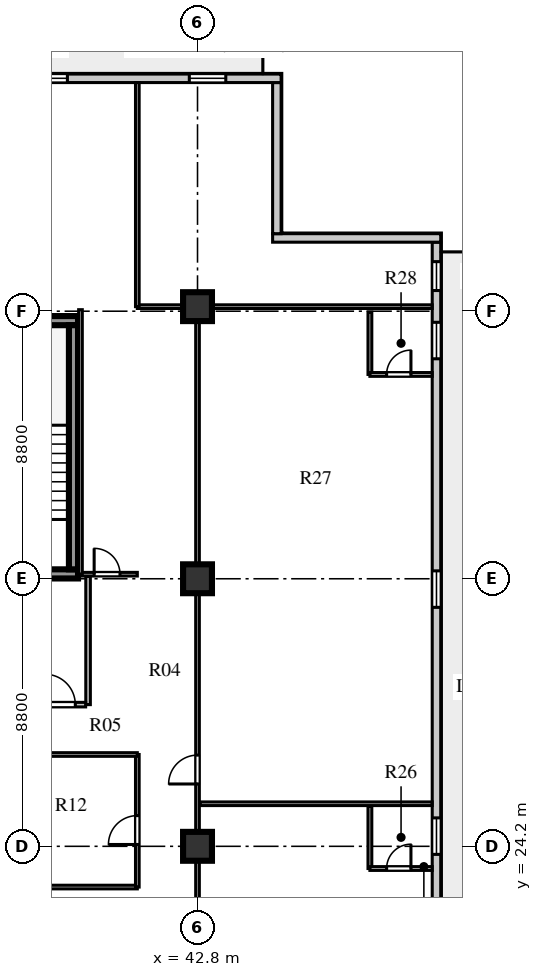
"""IFC4 building model, lengths in metres.
Left out: names, types, materials, properties, quantities, classifications, styles, units other than length and angle.
Written with IfcOpenShell. Run it as: python <this file> out.ifc"""

import sys

from ifc_helpers import new_model, si_unit, direction, frame, frame_2d, origin, origin_2d, place, context, subcontext, project, spatial, rectangle, extrude, element, fill, save


model = new_model("IFC4")
c1 = context("Model", 3, precision=1e-05, world=origin(), true_north=direction((0.0, 1.0)))
c2 = subcontext(c1, "Body", "Model", "MODEL_VIEW")
j1 = project(units=[si_unit("LENGTHUNIT", "METRE"), si_unit("PLANEANGLEUNIT", "RADIAN")], contexts=[c1])
p1 = place(None, origin())
s1 = spatial("IfcSite", under=j1, at=p1, CompositionType="ELEMENT")
p2 = place(p1, origin())
s2 = spatial("IfcBuilding", under=s1, at=p2, CompositionType="ELEMENT")
p3 = place(p2, frame((0.0, 0.0, 173.3)))
s3 = spatial("IfcBuildingStorey", under=s2, at=p3, CompositionType="ELEMENT", Elevation=173.3)
for number, where, z_axis, x_axis in (
    (1, (34.275, 33.16, 0.0), (0.0, 0.0, 1.0), (1.0, 0.0, 0.0)),
    (2, (34.275, 41.49, 0.0), (0.0, 0.0, 1.0), (1.0, 0.0, 0.0)),
):
    element("IfcWall", number, at=place(p3, frame(where, z_axis=z_axis, x_axis=x_axis)), inside=s3, PredefinedType="SHEAR", context=c2, shape_type="SweptSolid", body=[
        extrude(rectangle(XDim=4.595, YDim=0.3, at=frame_2d((2.298, 0.0))), origin(), (0.0, 0.0, 1.0), 3.6),
    ])
p4 = place(p3, frame((38.72, 33.31, 0.0), z_axis=(0.0, 0.0, 1.0), x_axis=(0.0, 1.0, 0.0)))
e3 = element("IfcWall", 3, at=p4, inside=s3, PredefinedType="SHEAR", context=c2, shape_type="SweptSolid", body=[
    extrude(rectangle(XDim=8.03, YDim=0.3, at=frame_2d((4.015, 0.0))), origin(), (0.0, 0.0, 1.0), 3.6),
])
for number, where, z_axis, x_axis in (
    (4, (42.8, 24.2, 0.0), (0.0, 0.0, 1.0), (1.0, 0.0, 0.0)),
    (5, (42.8, 33.0, 0.0), (0.0, 0.0, 1.0), (1.0, 0.0, 0.0)),
    (6, (42.8, 41.95, 0.0), (0.0, 0.0, 1.0), (1.0, 0.0, 0.0)),
):
    element("IfcColumn", number, at=place(p3, frame(where, z_axis=z_axis, x_axis=x_axis)), inside=s3, PredefinedType="COLUMN", context=c2, shape_type="SweptSolid", body=[
        extrude(rectangle(XDim=0.95, YDim=0.95, at=origin_2d()), origin(), (0.0, 0.0, 1.0), 3.6),
    ])
p5 = place(p3, frame((50.66, 13.13, 0.0), z_axis=(0.0, 0.0, 1.0), x_axis=(0.0, 1.0, 0.0)))
e7 = element("IfcWall", 7, at=p5, inside=s3, PredefinedType="STANDARD", context=c2, shape_type="SweptSolid", body=[
    extrude(rectangle(XDim=30.94, YDim=0.28, at=frame_2d((15.47, 0.0))), origin(), (0.0, 0.0, 1.0), 3.6),
])
p6 = place(p5, frame((0.64, 0.0, 0.8)))
e8 = element("IfcOpeningElement", 8, at=p6, cuts=e7, PredefinedType="OPENING", context=c2, shape_type="SweptSolid", body=[
    extrude(rectangle(XDim=0.95, YDim=1.65, at=frame_2d((0.475, 0.825))), frame((0.0, 0.15, 0.0), z_axis=(0.0, -1.0, 0.0), x_axis=(1.0, 0.0, 0.0)), (0.0, 0.0, 1.0), 0.3),
])
p7 = place(p5, frame((2.61, 0.0, 0.0)))
e9 = element("IfcOpeningElement", 9, at=p7, cuts=e7, PredefinedType="OPENING", context=c2, shape_type="SweptSolid", body=[
    extrude(rectangle(XDim=1.0, YDim=2.05, at=frame_2d((0.5, 1.025))), frame((0.0, 0.15, 0.0), z_axis=(0.0, -1.0, 0.0), x_axis=(1.0, 0.0, 0.0)), (0.0, 0.0, 1.0), 0.3),
])
p8 = place(p5, frame((6.105, 0.0, 0.8)))
e10 = element("IfcOpeningElement", 10, at=p8, cuts=e7, PredefinedType="OPENING", context=c2, shape_type="SweptSolid", body=[
    extrude(rectangle(XDim=1.8, YDim=2.0, at=frame_2d((0.9, 1.0))), frame((0.0, 0.15, 0.0), z_axis=(0.0, -1.0, 0.0), x_axis=(1.0, 0.0, 0.0)), (0.0, 0.0, 1.0), 0.3),
])
p9 = place(p5, frame((10.805, 0.0, 0.8)))
e11 = element("IfcOpeningElement", 11, at=p9, cuts=e7, PredefinedType="OPENING", context=c2, shape_type="SweptSolid", body=[
    extrude(rectangle(XDim=1.2, YDim=1.75, at=frame_2d((0.6, 0.875))), frame((0.0, 0.15, 0.0), z_axis=(0.0, -1.0, 0.0), x_axis=(1.0, 0.0, 0.0)), (0.0, 0.0, 1.0), 0.3),
])
p10 = place(p5, frame((18.93, 0.0, 0.8)))
e12 = element("IfcOpeningElement", 12, at=p10, cuts=e7, PredefinedType="OPENING", context=c2, shape_type="SweptSolid", body=[
    extrude(rectangle(XDim=1.2, YDim=1.75, at=frame_2d((0.6, 0.875))), frame((0.0, 0.15, 0.0), z_axis=(0.0, -1.0, 0.0), x_axis=(1.0, 0.0, 0.0)), (0.0, 0.0, 1.0), 0.3),
])
p11 = place(p5, frame((27.105, 0.0, 0.8)))
e13 = element("IfcOpeningElement", 13, at=p11, cuts=e7, PredefinedType="OPENING", context=c2, shape_type="SweptSolid", body=[
    extrude(rectangle(XDim=1.2, YDim=1.75, at=frame_2d((0.6, 0.875))), frame((0.0, 0.15, 0.0), z_axis=(0.0, -1.0, 0.0), x_axis=(1.0, 0.0, 0.0)), (0.0, 0.0, 1.0), 0.3),
])
p12 = place(p5, frame((29.35, 0.0, 0.8)))
e14 = element("IfcOpeningElement", 14, at=p12, cuts=e7, PredefinedType="OPENING", context=c2, shape_type="SweptSolid", body=[
    extrude(rectangle(XDim=0.95, YDim=1.65, at=frame_2d((0.475, 0.825))), frame((0.0, 0.15, 0.0), z_axis=(0.0, -1.0, 0.0), x_axis=(1.0, 0.0, 0.0)), (0.0, 0.0, 1.0), 0.3),
])
p13 = place(p3, frame((50.8, 44.21, 0.0), z_axis=(0.0, 0.0, 1.0), x_axis=(-1.0, 0.0, 0.0)))
e15 = element("IfcWall", 15, at=p13, inside=s3, PredefinedType="STANDARD", context=c2, shape_type="SweptSolid", body=[
    extrude(rectangle(XDim=5.53, YDim=0.28, at=frame_2d((2.765, 0.0))), origin(), (0.0, 0.0, 1.0), 3.6),
])
p14 = place(p3, frame((45.41, 44.35, 0.0), z_axis=(0.0, 0.0, 1.0), x_axis=(0.0, 1.0, 0.0)))
e16 = element("IfcWall", 16, at=p14, inside=s3, PredefinedType="STANDARD", context=c2, shape_type="SweptSolid", body=[
    extrude(rectangle(XDim=4.97, YDim=0.28, at=frame_2d((2.485, 0.0))), origin(), (0.0, 0.0, 1.0), 3.6),
])
p15 = place(p3, frame((45.55, 49.46, 0.0), z_axis=(0.0, 0.0, 1.0), x_axis=(-1.0, 0.0, 0.0)))
e17 = element("IfcWall", 17, at=p15, inside=s3, PredefinedType="STANDARD", context=c2, shape_type="SweptSolid", body=[
    extrude(rectangle(XDim=32.5, YDim=0.28, at=frame_2d((16.25, 0.0))), origin(), (0.0, 0.0, 1.0), 3.6),
])
p16 = place(p15, frame((30.55, 0.0, 0.0)))
e18 = element("IfcOpeningElement", 18, at=p16, cuts=e17, PredefinedType="OPENING", context=c2, shape_type="SweptSolid", body=[
    extrude(rectangle(XDim=1.0, YDim=2.05, at=frame_2d((0.5, 1.025))), frame((0.0, 0.15, 0.0), z_axis=(0.0, -1.0, 0.0), x_axis=(1.0, 0.0, 0.0)), (0.0, 0.0, 1.0), 0.3),
])
p17 = place(p15, frame((24.645, 0.0, 0.8)))
e19 = element("IfcOpeningElement", 19, at=p17, cuts=e17, PredefinedType="OPENING", context=c2, shape_type="SweptSolid", body=[
    extrude(rectangle(XDim=1.65, YDim=1.95, at=frame_2d((0.825, 0.975))), frame((0.0, 0.15, 0.0), z_axis=(0.0, -1.0, 0.0), x_axis=(1.0, 0.0, 0.0)), (0.0, 0.0, 1.0), 0.3),
])
p18 = place(p15, frame((18.405, 0.0, 0.8)))
e20 = element("IfcOpeningElement", 20, at=p18, cuts=e17, PredefinedType="OPENING", context=c2, shape_type="SweptSolid", body=[
    extrude(rectangle(XDim=1.2, YDim=1.75, at=frame_2d((0.6, 0.875))), frame((0.0, 0.15, 0.0), z_axis=(0.0, -1.0, 0.0), x_axis=(1.0, 0.0, 0.0)), (0.0, 0.0, 1.0), 0.3),
])
p19 = place(p15, frame((16.015, 0.0, 0.8)))
e21 = element("IfcOpeningElement", 21, at=p19, cuts=e17, PredefinedType="OPENING", context=c2, shape_type="SweptSolid", body=[
    extrude(rectangle(XDim=1.2, YDim=1.75, at=frame_2d((0.6, 0.875))), frame((0.0, 0.15, 0.0), z_axis=(0.0, -1.0, 0.0), x_axis=(1.0, 0.0, 0.0)), (0.0, 0.0, 1.0), 0.3),
])
p20 = place(p15, frame((12.29, 0.0, 0.8)))
e22 = element("IfcOpeningElement", 22, at=p20, cuts=e17, PredefinedType="OPENING", context=c2, shape_type="SweptSolid", body=[
    extrude(rectangle(XDim=1.8, YDim=2.0, at=frame_2d((0.9, 1.0))), frame((0.0, 0.15, 0.0), z_axis=(0.0, -1.0, 0.0), x_axis=(1.0, 0.0, 0.0)), (0.0, 0.0, 1.0), 0.3),
])
p21 = place(p15, frame((7.03, 0.0, 0.8)))
e23 = element("IfcOpeningElement", 23, at=p21, cuts=e17, PredefinedType="OPENING", context=c2, shape_type="SweptSolid", body=[
    extrude(rectangle(XDim=1.5, YDim=2.0, at=frame_2d((0.75, 1.0))), frame((0.0, 0.15, 0.0), z_axis=(0.0, -1.0, 0.0), x_axis=(1.0, 0.0, 0.0)), (0.0, 0.0, 1.0), 0.3),
])
p22 = place(p15, frame((1.82, 0.0, 0.8)))
e24 = element("IfcOpeningElement", 24, at=p22, cuts=e17, PredefinedType="OPENING", context=c2, shape_type="SweptSolid", body=[
    extrude(rectangle(XDim=1.2, YDim=1.75, at=frame_2d((0.6, 0.875))), frame((0.0, 0.15, 0.0), z_axis=(0.0, -1.0, 0.0), x_axis=(1.0, 0.0, 0.0)), (0.0, 0.0, 1.0), 0.3),
])
p23 = place(p3, frame((39.2, 28.86, 0.0), z_axis=(0.0, 0.0, 1.0), x_axis=(0.0, 1.0, 0.0)))
e25 = element("IfcWall", 25, at=p23, inside=s3, PredefinedType="PARTITIONING", context=c2, shape_type="SweptSolid", body=[
    extrude(rectangle(XDim=4.22, YDim=0.15, at=frame_2d((2.11, 0.0))), origin(), (0.0, 0.0, 1.0), 3.6),
])
p24 = place(p3, frame((37.48, 28.86, 0.0), z_axis=(0.0, 0.0, 1.0), x_axis=(1.0, 0.0, 0.0)))
e26 = element("IfcWall", 26, at=p24, inside=s3, PredefinedType="PARTITIONING", context=c2, shape_type="SweptSolid", body=[
    extrude(rectangle(XDim=1.64, YDim=0.15, at=frame_2d((0.82, 0.0))), origin(), (0.0, 0.0, 1.0), 3.6),
])
p25 = place(p24, frame((0.3, 0.0, 0.0)))
e27 = element("IfcOpeningElement", 27, at=p25, cuts=e26, PredefinedType="OPENING", context=c2, shape_type="SweptSolid", body=[
    extrude(rectangle(XDim=1.0, YDim=2.1, at=frame_2d((0.5, 1.05))), frame((0.0, 0.085, 0.0), z_axis=(0.0, -1.0, 0.0), x_axis=(1.0, 0.0, 0.0)), (0.0, 0.0, 1.0), 0.17),
])
p26 = place(p3, frame((27.15, 22.86, 0.0), z_axis=(0.0, 0.0, 1.0), x_axis=(1.0, 0.0, 0.0)))
e28 = element("IfcWall", 28, at=p26, inside=s3, PredefinedType="PARTITIONING", context=c2, shape_type="SweptSolid", body=[
    extrude(rectangle(XDim=13.67, YDim=0.12, at=frame_2d((6.835, 0.0))), origin(), (0.0, 0.0, 1.0), 3.6),
])
p27 = place(p26, frame((2.2, 0.0, 0.0)))
e29 = element("IfcOpeningElement", 29, at=p27, cuts=e28, PredefinedType="OPENING", context=c2, shape_type="SweptSolid", body=[
    extrude(rectangle(XDim=0.9, YDim=2.08, at=frame_2d((0.45, 1.04))), frame((0.0, 0.07, 0.0), z_axis=(0.0, -1.0, 0.0), x_axis=(1.0, 0.0, 0.0)), (0.0, 0.0, 1.0), 0.14),
])
p28 = place(p3, frame((42.8, 15.25, 0.0), z_axis=(0.0, 0.0, 1.0), x_axis=(0.0, 1.0, 0.0)))
e30 = element("IfcWall", 30, at=p28, inside=s3, PredefinedType="PARTITIONING", context=c2, shape_type="SweptSolid", body=[
    extrude(rectangle(XDim=26.7, YDim=0.12, at=frame_2d((13.35, 0.0))), origin(), (0.0, 0.0, 1.0), 2.95),
])
p29 = place(p28, frame((0.75, 0.0, 0.0)))
e31 = element("IfcOpeningElement", 31, at=p29, cuts=e30, PredefinedType="OPENING", context=c2, shape_type="SweptSolid", body=[
    extrude(rectangle(XDim=0.95, YDim=2.1, at=frame_2d((0.475, 1.05))), frame((0.0, 0.07, 0.0), z_axis=(0.0, -1.0, 0.0), x_axis=(1.0, 0.0, 0.0)), (0.0, 0.0, 1.0), 0.14),
])
p30 = place(p28, frame((11.0, 0.0, 0.0)))
e32 = element("IfcOpeningElement", 32, at=p30, cuts=e30, PredefinedType="OPENING", context=c2, shape_type="SweptSolid", body=[
    extrude(rectangle(XDim=0.95, YDim=2.1, at=frame_2d((0.475, 1.05))), frame((0.0, 0.07, 0.0), z_axis=(0.0, -1.0, 0.0), x_axis=(1.0, 0.0, 0.0)), (0.0, 0.0, 1.0), 0.14),
])
p31 = place(p3, frame((40.82, 41.95, 0.0), z_axis=(0.0, 0.0, 1.0), x_axis=(1.0, 0.0, 0.0)))
e33 = element("IfcWall", 33, at=p31, inside=s3, PredefinedType="PARTITIONING", context=c2, shape_type="SweptSolid", body=[
    extrude(rectangle(XDim=9.7, YDim=0.12, at=frame_2d((4.85, 0.0))), origin(), (0.0, 0.0, 1.0), 2.95),
])
p32 = place(p3, frame((40.82, 22.86, 0.0), z_axis=(0.0, 0.0, 1.0), x_axis=(0.0, 1.0, 0.0)))
e34 = element("IfcWall", 34, at=p32, inside=s3, PredefinedType="PARTITIONING", context=c2, shape_type="SweptSolid", body=[
    extrude(rectangle(XDim=4.36, YDim=0.12, at=frame_2d((2.18, 0.0))), origin(), (0.0, 0.0, 1.0), 3.6),
])
p33 = place(p32, frame((1.4, 0.0, 0.0)))
e35 = element("IfcOpeningElement", 35, at=p33, cuts=e34, PredefinedType="OPENING", context=c2, shape_type="SweptSolid", body=[
    extrude(rectangle(XDim=0.95, YDim=2.1, at=frame_2d((0.475, 1.05))), frame((0.0, 0.07, 0.0), z_axis=(0.0, -1.0, 0.0), x_axis=(1.0, 0.0, 0.0)), (0.0, 0.0, 1.0), 0.14),
])
p34 = place(p3, frame((36.9, 27.22, 0.0), z_axis=(0.0, 0.0, 1.0), x_axis=(1.0, 0.0, 0.0)))
e36 = element("IfcWall", 36, at=p34, inside=s3, PredefinedType="PARTITIONING", context=c2, shape_type="SweptSolid", body=[
    extrude(rectangle(XDim=3.92, YDim=0.12, at=frame_2d((1.96, 0.0))), origin(), (0.0, 0.0, 1.0), 3.25),
])
p35 = place(p3, frame((48.47, 23.47, 0.0), z_axis=(0.0, 0.0, 1.0), x_axis=(0.0, 1.0, 0.0)))
e37 = element("IfcWall", 37, at=p35, inside=s3, PredefinedType="PLUMBINGWALL", context=c2, shape_type="SweptSolid", body=[
    extrude(rectangle(XDim=2.05, YDim=0.125, at=frame_2d((1.025, 0.0))), origin(), (0.0, 0.0, 1.0), 3.6),
])
p36 = place(p3, frame((48.47, 23.47, 0.0), z_axis=(0.0, 0.0, 1.0), x_axis=(1.0, 0.0, 0.0)))
e38 = element("IfcWall", 38, at=p36, inside=s3, PredefinedType="PLUMBINGWALL", context=c2, shape_type="SweptSolid", body=[
    extrude(rectangle(XDim=2.05, YDim=0.125, at=frame_2d((1.025, 0.0))), origin(), (0.0, 0.0, 1.0), 3.6),
])
p37 = place(p36, frame((0.55, 0.0, 0.0)))
e39 = element("IfcOpeningElement", 39, at=p37, cuts=e38, PredefinedType="OPENING", context=c2, shape_type="SweptSolid", body=[
    extrude(rectangle(XDim=0.8, YDim=2.05, at=frame_2d((0.4, 1.025))), frame((0.0, 0.073, 0.0), z_axis=(0.0, -1.0, 0.0), x_axis=(1.0, 0.0, 0.0)), (0.0, 0.0, 1.0), 0.145),
])
p38 = place(p3, frame((42.88, 25.6, 0.0), z_axis=(0.0, 0.0, 1.0), x_axis=(1.0, 0.0, 0.0)))
e40 = element("IfcWall", 40, at=p38, inside=s3, PredefinedType="PARTITIONING", context=c2, shape_type="SweptSolid", body=[
    extrude(rectangle(XDim=7.64, YDim=0.12, at=frame_2d((3.82, 0.0))), origin(), (0.0, 0.0, 1.0), 3.6),
])
p39 = place(p3, frame((48.47, 39.72, 0.0), z_axis=(0.0, 0.0, 1.0), x_axis=(0.0, 1.0, 0.0)))
e41 = element("IfcWall", 41, at=p39, inside=s3, PredefinedType="PLUMBINGWALL", context=c2, shape_type="SweptSolid", body=[
    extrude(rectangle(XDim=2.05, YDim=0.125, at=frame_2d((1.025, 0.0))), origin(), (0.0, 0.0, 1.0), 3.6),
])
p40 = place(p3, frame((48.47, 39.72, 0.0), z_axis=(0.0, 0.0, 1.0), x_axis=(1.0, 0.0, 0.0)))
e42 = element("IfcWall", 42, at=p40, inside=s3, PredefinedType="PLUMBINGWALL", context=c2, shape_type="SweptSolid", body=[
    extrude(rectangle(XDim=2.05, YDim=0.125, at=frame_2d((1.025, 0.0))), origin(), (0.0, 0.0, 1.0), 3.6),
])
p41 = place(p40, frame((0.55, 0.0, 0.0)))
e43 = element("IfcOpeningElement", 43, at=p41, cuts=e42, PredefinedType="OPENING", context=c2, shape_type="SweptSolid", body=[
    extrude(rectangle(XDim=0.8, YDim=2.05, at=frame_2d((0.4, 1.025))), frame((0.0, 0.073, 0.0), z_axis=(0.0, -1.0, 0.0), x_axis=(1.0, 0.0, 0.0)), (0.0, 0.0, 1.0), 0.145),
])
p42 = place(p3, frame((38.95, 33.15, 0.0), z_axis=(0.0, 0.0, 1.0), x_axis=(1.0, 0.0, 0.0)))
e44 = element("IfcWall", 44, at=p42, inside=s3, PredefinedType="PARTITIONING", context=c2, shape_type="SweptSolid", body=[
    extrude(rectangle(XDim=1.87, YDim=0.12, at=frame_2d((0.935, 0.0))), origin(), (0.0, 0.0, 1.0), 3.6),
])
p43 = place(p42, frame((0.45, 0.0, 0.0)))
e45 = element("IfcOpeningElement", 45, at=p43, cuts=e44, PredefinedType="OPENING", context=c2, shape_type="SweptSolid", body=[
    extrude(rectangle(XDim=0.85, YDim=2.05, at=frame_2d((0.425, 1.025))), frame((0.0, 0.07, 0.0), z_axis=(0.0, -1.0, 0.0), x_axis=(1.0, 0.0, 0.0)), (0.0, 0.0, 1.0), 0.14),
])
p44 = place(p3, frame((38.95, 33.15, 0.0), z_axis=(0.0, 0.0, 1.0), x_axis=(0.0, 1.0, 0.0)))
e46 = element("IfcWall", 46, at=p44, inside=s3, PredefinedType="PARTITIONING", context=c2, shape_type="SweptSolid", body=[
    extrude(rectangle(XDim=8.7, YDim=0.12, at=frame_2d((4.35, 0.0))), origin(), (0.0, 0.0, 1.0), 3.6),
])
p45 = place(p3, frame((40.82, 41.95, 0.0), z_axis=(0.0, 0.0, 1.0), x_axis=(0.0, 1.0, 0.0)))
e47 = element("IfcWall", 47, at=p45, inside=s3, PredefinedType="PARTITIONING", context=c2, shape_type="SweptSolid", body=[
    extrude(rectangle(XDim=7.37, YDim=0.12, at=frame_2d((3.685, 0.0))), origin(), (0.0, 0.0, 1.0), 3.6),
])
p46 = place(p9, origin())
e48 = element("IfcWindow", 48, at=p46, inside=s3, PartitioningType="SINGLE_PANEL", PredefinedType="WINDOW", context=c2, shape_type="SweptSolid", body=[
    extrude(rectangle(XDim=1.2, YDim=1.75, at=frame_2d((0.6, 0.875))), frame((0.0, 0.03, 0.0), z_axis=(0.0, -1.0, 0.0), x_axis=(1.0, 0.0, 0.0)), (0.0, 0.0, 1.0), 0.06),
])
fill(e11, e48)
p47 = place(p10, origin())
e49 = element("IfcWindow", 49, at=p47, inside=s3, PartitioningType="SINGLE_PANEL", PredefinedType="WINDOW", context=c2, shape_type="SweptSolid", body=[
    extrude(rectangle(XDim=1.2, YDim=1.75, at=frame_2d((0.6, 0.875))), frame((0.0, 0.03, 0.0), z_axis=(0.0, -1.0, 0.0), x_axis=(1.0, 0.0, 0.0)), (0.0, 0.0, 1.0), 0.06),
])
fill(e12, e49)
p48 = place(p11, origin())
e50 = element("IfcWindow", 50, at=p48, inside=s3, PartitioningType="SINGLE_PANEL", PredefinedType="WINDOW", context=c2, shape_type="SweptSolid", body=[
    extrude(rectangle(XDim=1.2, YDim=1.75, at=frame_2d((0.6, 0.875))), frame((0.0, 0.03, 0.0), z_axis=(0.0, -1.0, 0.0), x_axis=(1.0, 0.0, 0.0)), (0.0, 0.0, 1.0), 0.06),
])
fill(e13, e50)
p49 = place(p12, origin())
e51 = element("IfcWindow", 51, at=p49, inside=s3, PartitioningType="SINGLE_PANEL", PredefinedType="WINDOW", context=c2, shape_type="SweptSolid", body=[
    extrude(rectangle(XDim=0.95, YDim=1.65, at=frame_2d((0.475, 0.825))), frame((0.0, 0.03, 0.0), z_axis=(0.0, -1.0, 0.0), x_axis=(1.0, 0.0, 0.0)), (0.0, 0.0, 1.0), 0.06),
])
fill(e14, e51)
p50 = place(p21, origin())
e52 = element("IfcWindow", 52, at=p50, inside=s3, PartitioningType="SINGLE_PANEL", PredefinedType="WINDOW", context=c2, shape_type="SweptSolid", body=[
    extrude(rectangle(XDim=1.5, YDim=2.0, at=frame_2d((0.75, 1.0))), frame((0.0, 0.03, 0.0), z_axis=(0.0, -1.0, 0.0), x_axis=(1.0, 0.0, 0.0)), (0.0, 0.0, 1.0), 0.06),
])
fill(e23, e52)
p51 = place(p22, origin())
e53 = element("IfcWindow", 53, at=p51, inside=s3, PartitioningType="SINGLE_PANEL", PredefinedType="WINDOW", context=c2, shape_type="SweptSolid", body=[
    extrude(rectangle(XDim=1.2, YDim=1.75, at=frame_2d((0.6, 0.875))), frame((0.0, 0.03, 0.0), z_axis=(0.0, -1.0, 0.0), x_axis=(1.0, 0.0, 0.0)), (0.0, 0.0, 1.0), 0.06),
])
fill(e24, e53)
p52 = place(p25, origin())
e54 = element("IfcDoor", 54, at=p52, inside=s3, OperationType="SINGLE_SWING_LEFT", PredefinedType="DOOR", context=c2, shape_type="SweptSolid", body=[
    extrude(rectangle(XDim=1.0, YDim=2.1, at=frame_2d((0.5, 1.05))), frame((0.0, 0.025, 0.0), z_axis=(0.0, -1.0, 0.0), x_axis=(1.0, 0.0, 0.0)), (0.0, 0.0, 1.0), 0.05),
])
fill(e27, e54)
p53 = place(p33, frame((0.95, 0.0, 0.0), z_axis=(0.0, 0.0, 1.0), x_axis=(-1.0, 0.0, 0.0)))
e55 = element("IfcDoor", 55, at=p53, inside=s3, OperationType="SINGLE_SWING_RIGHT", PredefinedType="DOOR", context=c2, shape_type="SweptSolid", body=[
    extrude(rectangle(XDim=0.95, YDim=2.1, at=frame_2d((0.475, 1.05))), frame((0.0, 0.025, 0.0), z_axis=(0.0, -1.0, 0.0), x_axis=(1.0, 0.0, 0.0)), (0.0, 0.0, 1.0), 0.05),
])
fill(e35, e55)
p54 = place(p37, frame((0.8, 0.0, 0.0), z_axis=(0.0, 0.0, 1.0), x_axis=(-1.0, 0.0, 0.0)))
e56 = element("IfcDoor", 56, at=p54, inside=s3, OperationType="SINGLE_SWING_LEFT", PredefinedType="DOOR", context=c2, shape_type="SweptSolid", body=[
    extrude(rectangle(XDim=0.8, YDim=2.05, at=frame_2d((0.4, 1.025))), frame((0.0, 0.025, 0.0), z_axis=(0.0, -1.0, 0.0), x_axis=(1.0, 0.0, 0.0)), (0.0, 0.0, 1.0), 0.05),
])
fill(e39, e56)
p55 = place(p30, origin())
e57 = element("IfcDoor", 57, at=p55, inside=s3, OperationType="SINGLE_SWING_LEFT", PredefinedType="DOOR", context=c2, shape_type="SweptSolid", body=[
    extrude(rectangle(XDim=0.95, YDim=2.1, at=frame_2d((0.475, 1.05))), frame((0.0, 0.025, 0.0), z_axis=(0.0, -1.0, 0.0), x_axis=(1.0, 0.0, 0.0)), (0.0, 0.0, 1.0), 0.05),
])
fill(e32, e57)
p56 = place(p41, frame((0.8, 0.0, 0.0), z_axis=(0.0, 0.0, 1.0), x_axis=(-1.0, 0.0, 0.0)))
e58 = element("IfcDoor", 58, at=p56, inside=s3, OperationType="SINGLE_SWING_LEFT", PredefinedType="DOOR", context=c2, shape_type="SweptSolid", body=[
    extrude(rectangle(XDim=0.8, YDim=2.05, at=frame_2d((0.4, 1.025))), frame((0.0, 0.025, 0.0), z_axis=(0.0, -1.0, 0.0), x_axis=(1.0, 0.0, 0.0)), (0.0, 0.0, 1.0), 0.05),
])
fill(e43, e58)
p57 = place(p43, origin())
e59 = element("IfcDoor", 59, at=p57, inside=s3, OperationType="SINGLE_SWING_LEFT", PredefinedType="DOOR", context=c2, shape_type="SweptSolid", body=[
    extrude(rectangle(XDim=0.85, YDim=2.05, at=frame_2d((0.425, 1.025))), frame((0.0, 0.025, 0.0), z_axis=(0.0, -1.0, 0.0), x_axis=(1.0, 0.0, 0.0)), (0.0, 0.0, 1.0), 0.05),
])
fill(e45, e59)
save(model, sys.argv[1])
